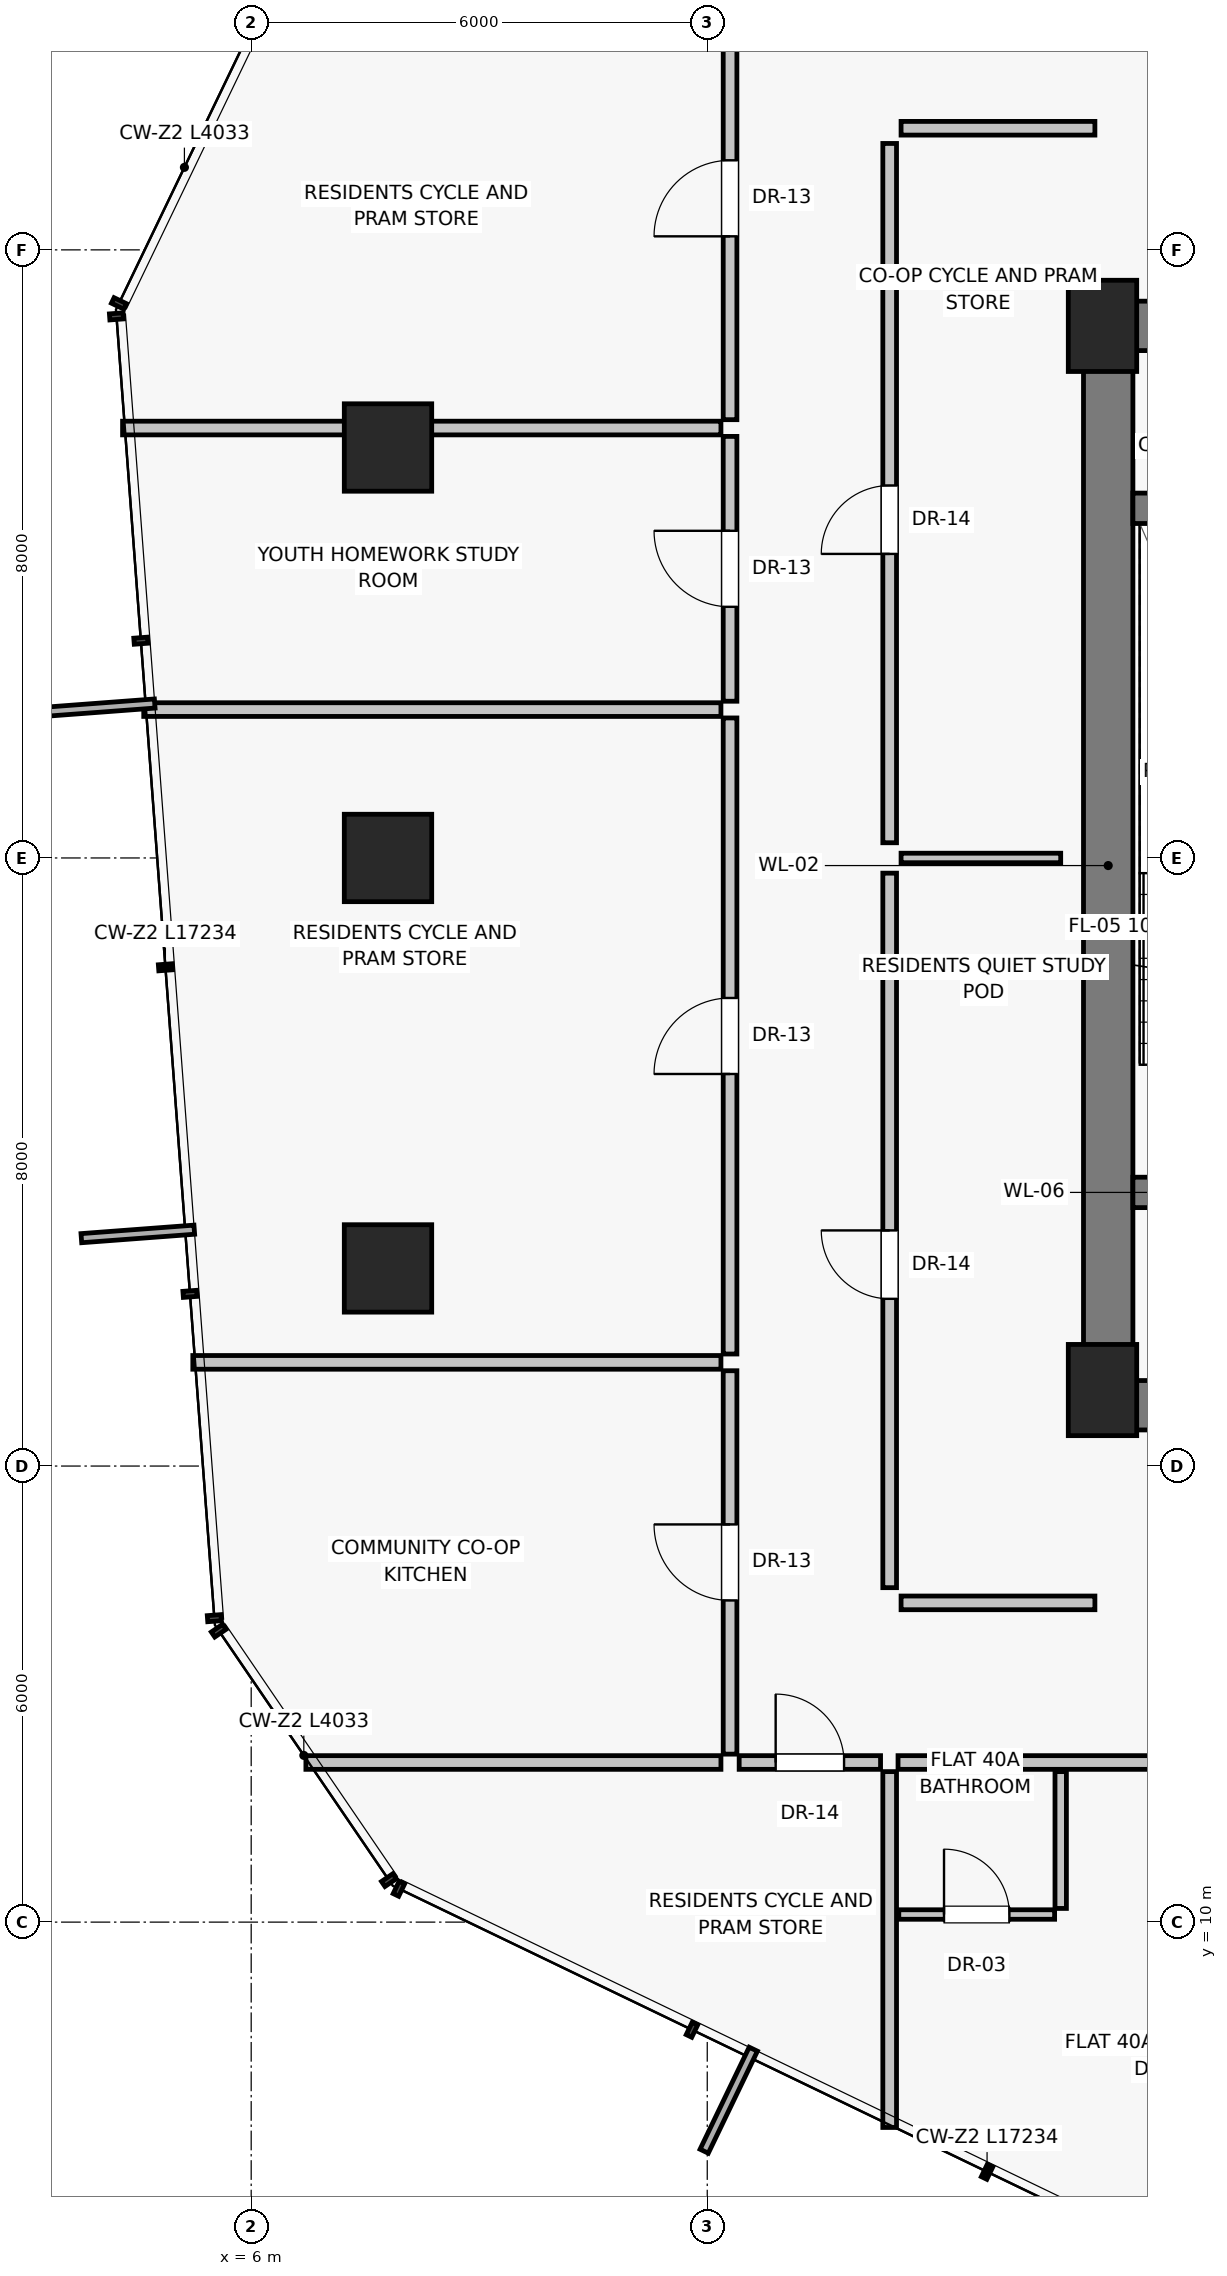
"""IFC4 building model, lengths in metres.
Left out: names, types, materials, properties, quantities, classifications, styles, units other than length and angle.
Written with IfcOpenShell. Run it as: python <this file> out.ifc"""

import sys

from ifc_helpers import new_model, si_unit, direction, frame, frame_2d, origin, origin_2d, place, context, subcontext, project, spatial, rectangle, extrude, source, transform, mapped, element, fill, save


model = new_model("IFC4")
c1 = context("Model", 3, precision=1e-05, world=origin(), true_north=direction((0.0, 1.0)))
c2 = subcontext(c1, "Body", "Model", "MODEL_VIEW")
j1 = project(units=[si_unit("LENGTHUNIT", "METRE"), si_unit("PLANEANGLEUNIT", "RADIAN")], contexts=[c1])
p1 = place(None, origin())
s1 = spatial("IfcSite", under=j1, at=p1, CompositionType="ELEMENT")
p2 = place(p1, origin())
s2 = spatial("IfcBuilding", under=s1, at=p2, CompositionType="ELEMENT")
p3 = place(p2, frame((0.0, 0.0, 142.5)))
s3 = spatial("IfcBuildingStorey", under=s2, at=p3, CompositionType="ELEMENT", Elevation=142.5)
for number, where, z_axis, x_axis in (
    (1, (17.2, 17.0, 0.0), (0.0, 0.0, 1.0), (1.0, 0.0, 0.0)),
    (2, (17.2, 31.0, 0.0), (0.0, 0.0, 1.0), (1.0, 0.0, 0.0)),
):
    element("IfcColumn", number, at=place(p3, frame(where, z_axis=z_axis, x_axis=x_axis)), inside=s3, PredefinedType="PILASTER", context=c2, shape_type="SweptSolid", body=[
        extrude(rectangle(XDim=0.9, YDim=1.2, at=origin_2d()), origin(), (0.0, 0.0, 1.0), 3.25),
    ])
for number, where, z_axis, x_axis in (
    (3, (7.8, 29.4, 0.0), (0.0, 0.0, 1.0), (1.0, 0.0, 0.0)),
    (4, (7.8, 24.0, 0.0), (0.0, 0.0, 1.0), (1.0, 0.0, 0.0)),
    (5, (7.8, 18.6, 0.0), (0.0, 0.0, 1.0), (1.0, 0.0, 0.0)),
):
    element("IfcColumn", number, at=place(p3, frame(where, z_axis=z_axis, x_axis=x_axis)), inside=s3, PredefinedType="COLUMN", context=c2, shape_type="SweptSolid", body=[
        extrude(rectangle(XDim=1.15, YDim=1.15, at=origin_2d()), origin(), (0.0, 0.0, 1.0), 3.25),
    ])
p4 = place(p3, frame((17.275, 16.8, 0.0), z_axis=(0.0, 0.0, 1.0), x_axis=(0.0, 1.0, 0.0)))
e6 = element("IfcWall", 6, at=p4, inside=s3, PredefinedType="SHEAR", context=c2, shape_type="SweptSolid", body=[
    extrude(rectangle(XDim=14.2, YDim=0.65, at=frame_2d((7.1, 0.0))), origin(), (0.0, 0.0, 1.0), 3.0),
])
p5 = place(p3, frame((17.2, 16.8, 0.0), z_axis=(0.0, 0.0, 1.0), x_axis=(1.0, 0.0, 0.0)))
e7 = element("IfcWall", 7, at=p5, inside=s3, PredefinedType="SHEAR", context=c2, shape_type="SweptSolid", body=[
    extrude(rectangle(XDim=5.85, YDim=0.65, at=frame_2d((2.925, 0.0))), origin(), (0.0, 0.0, 1.0), 3.0),
])
p6 = place(p5, frame((1.15, 0.0, 0.0)))
e8 = element("IfcOpeningElement", 8, at=p6, cuts=e7, PredefinedType="OPENING", context=c2, shape_type="SweptSolid", body=[
    extrude(rectangle(XDim=1.2, YDim=2.03, at=frame_2d((0.6, 1.015))), frame((0.0, 0.335, 0.0), z_axis=(0.0, -1.0, 0.0), x_axis=(1.0, 0.0, 0.0)), (0.0, 0.0, 1.0), 0.67),
])
p7 = place(p3, frame((17.2, 31.0, 0.0), z_axis=(0.0, 0.0, 1.0), x_axis=(1.0, 0.0, 0.0)))
e9 = element("IfcWall", 9, at=p7, inside=s3, PredefinedType="SHEAR", context=c2, shape_type="SweptSolid", body=[
    extrude(rectangle(XDim=3.8, YDim=0.65, at=frame_2d((1.9, 0.0))), origin(), (0.0, 0.0, 1.0), 3.0),
])
p8 = place(p7, frame((1.25, 0.0, 0.0)))
e10 = element("IfcOpeningElement", 10, at=p8, cuts=e9, PredefinedType="OPENING", context=c2, shape_type="SweptSolid", body=[
    extrude(rectangle(XDim=0.86, YDim=2.01, at=frame_2d((0.43, 1.005))), frame((0.0, 0.335, 0.0), z_axis=(0.0, -1.0, 0.0), x_axis=(1.0, 0.0, 0.0)), (0.0, 0.0, 1.0), 0.67),
])
p9 = place(p3, frame((17.6, 19.6, 0.0), z_axis=(0.0, 0.0, 1.0), x_axis=(1.0, 0.0, 0.0)))
e11 = element("IfcWall", 11, at=p9, inside=s3, PredefinedType="SHEAR", context=c2, shape_type="SweptSolid", body=[
    extrude(rectangle(XDim=3.4, YDim=0.4, at=frame_2d((1.7, 0.0))), origin(), (0.0, 0.0, 1.0), 3.0),
])
p10 = place(p9, frame((1.05, 0.0, 0.0)))
e12 = element("IfcOpeningElement", 12, at=p10, cuts=e11, PredefinedType="OPENING", context=c2, shape_type="SweptSolid", body=[
    extrude(rectangle(XDim=1.1, YDim=2.03, at=frame_2d((0.55, 1.015))), frame((0.0, 0.21, 0.0), z_axis=(0.0, -1.0, 0.0), x_axis=(1.0, 0.0, 0.0)), (0.0, 0.0, 1.0), 0.42),
])
p11 = place(p3, frame((17.6, 28.6, 0.0), z_axis=(0.0, 0.0, 1.0), x_axis=(1.0, 0.0, 0.0)))
e13 = element("IfcWall", 13, at=p11, inside=s3, PredefinedType="SHEAR", context=c2, shape_type="SweptSolid", body=[
    extrude(rectangle(XDim=3.4, YDim=0.4, at=frame_2d((1.7, 0.0))), origin(), (0.0, 0.0, 1.0), 3.0),
])
p12 = place(p3, frame((14.4, 14.4, 0.0), z_axis=(0.0, 0.0, 1.0), x_axis=(0.0, 1.0, 0.0)))
e14 = element("IfcWall", 14, at=p12, inside=s3, PredefinedType="PARTITIONING", context=c2, shape_type="SweptSolid", body=[
    extrude(rectangle(XDim=9.4, YDim=0.18, at=frame_2d((4.7, 0.0))), origin(), (0.0, 0.0, 1.0), 3.0),
])
p13 = place(p12, frame((3.8, 0.0, 0.0)))
e15 = element("IfcOpeningElement", 15, at=p13, cuts=e14, PredefinedType="OPENING", context=c2, shape_type="SweptSolid", body=[
    extrude(rectangle(XDim=0.9, YDim=2.01, at=frame_2d((0.45, 1.005))), frame((0.0, 0.1, 0.0), z_axis=(0.0, -1.0, 0.0), x_axis=(1.0, 0.0, 0.0)), (0.0, 0.0, 1.0), 0.2),
])
p14 = place(p3, frame((14.4, 24.2, 0.0), z_axis=(0.0, 0.0, 1.0), x_axis=(0.0, 1.0, 0.0)))
e16 = element("IfcWall", 16, at=p14, inside=s3, PredefinedType="PARTITIONING", context=c2, shape_type="SweptSolid", body=[
    extrude(rectangle(XDim=9.2, YDim=0.18, at=frame_2d((4.6, 0.0))), origin(), (0.0, 0.0, 1.0), 3.0),
])
p15 = place(p14, frame((3.8, 0.0, 0.0)))
e17 = element("IfcOpeningElement", 17, at=p15, cuts=e16, PredefinedType="OPENING", context=c2, shape_type="SweptSolid", body=[
    extrude(rectangle(XDim=0.9, YDim=2.01, at=frame_2d((0.45, 1.005))), frame((0.0, 0.1, 0.0), z_axis=(0.0, -1.0, 0.0), x_axis=(1.0, 0.0, 0.0)), (0.0, 0.0, 1.0), 0.2),
])
p16 = place(p3, frame((14.55, 24.0, 0.0), z_axis=(0.0, 0.0, 1.0), x_axis=(1.0, 0.0, 0.0)))
e18 = element("IfcWall", 18, at=p16, inside=s3, PredefinedType="PARTITIONING", context=c2, shape_type="SweptSolid", body=[
    extrude(rectangle(XDim=2.1, YDim=0.125, at=frame_2d((1.05, 0.0))), origin(), (0.0, 0.0, 1.0), 3.0),
])
for number, where, z_axis, x_axis in (
    (19, (14.55, 14.2, 0.0), (0.0, 0.0, 1.0), (1.0, 0.0, 0.0)),
    (20, (14.55, 33.6, 0.0), (0.0, 0.0, 1.0), (1.0, 0.0, 0.0)),
):
    element("IfcWall", number, at=place(p3, frame(where, z_axis=z_axis, x_axis=x_axis)), inside=s3, PredefinedType="PARTITIONING", context=c2, shape_type="SweptSolid", body=[
        extrude(rectangle(XDim=2.55, YDim=0.18, at=frame_2d((1.275, 0.0))), origin(), (0.0, 0.0, 1.0), 3.0),
    ])
p17 = place(p3, frame((14.4, 11.98, 0.0), z_axis=(0.0, 0.0, 1.0), x_axis=(0.0, -1.0, 0.0)))
e21 = element("IfcWall", 21, at=p17, inside=s3, PredefinedType="PARTITIONING", context=c2, shape_type="SweptSolid", body=[
    extrude(rectangle(XDim=4.681, YDim=0.18, at=frame_2d((2.341, 0.0))), origin(), (0.0, 0.0, 1.0), 3.0),
])
p18 = place(p3, frame((14.51, 12.1, 0.0), z_axis=(0.0, 0.0, 1.0), x_axis=(1.0, 0.0, 0.0)))
e22 = element("IfcWall", 22, at=p18, inside=s3, PredefinedType="PARTITIONING", context=c2, shape_type="SweptSolid", body=[
    extrude(rectangle(XDim=11.124, YDim=0.18, at=frame_2d((5.562, 0.0))), origin(), (0.0, 0.0, 1.0), 2.58),
])
p19 = place(p18, frame((3.717, 0.0, 0.0)))
e23 = element("IfcOpeningElement", 23, at=p19, cuts=e22, PredefinedType="OPENING", context=c2, shape_type="SweptSolid", body=[
    extrude(rectangle(XDim=0.95, YDim=2.02, at=frame_2d((0.475, 1.01))), frame((0.0, 0.1, 0.0), z_axis=(0.0, -1.0, 0.0), x_axis=(1.0, 0.0, 0.0)), (0.0, 0.0, 1.0), 0.2),
])
p20 = place(p3, frame((16.65, 11.98, 0.0), z_axis=(0.0, 0.0, 1.0), x_axis=(0.0, -1.0, 0.0)))
e24 = element("IfcWall", 24, at=p20, inside=s3, PredefinedType="PARTITIONING", context=c2, shape_type="SweptSolid", body=[
    extrude(rectangle(XDim=1.8, YDim=0.15, at=frame_2d((0.9, 0.0))), origin(), (0.0, 0.0, 1.0), 3.0),
])
p21 = place(p3, frame((14.52, 10.1, 0.0), z_axis=(0.0, 0.0, 1.0), x_axis=(1.0, 0.0, 0.0)))
e25 = element("IfcWall", 25, at=p21, inside=s3, PredefinedType="PARTITIONING", context=c2, shape_type="SweptSolid", body=[
    extrude(rectangle(XDim=2.05, YDim=0.125, at=frame_2d((1.025, 0.0))), origin(), (0.0, 0.0, 1.0), 3.0),
])
p22 = place(p21, frame((0.595, 0.0, 0.0)))
e26 = element("IfcOpeningElement", 26, at=p22, cuts=e25, PredefinedType="OPENING", context=c2, shape_type="SweptSolid", body=[
    extrude(rectangle(XDim=0.86, YDim=2.01, at=frame_2d((0.43, 1.005))), frame((0.0, 0.073, 0.0), z_axis=(0.0, -1.0, 0.0), x_axis=(1.0, 0.0, 0.0)), (0.0, 0.0, 1.0), 0.145),
])
p23 = place(p3, frame((12.18, 12.1, 0.0), z_axis=(0.0, 0.0, 1.0), x_axis=(-1.0, 0.0, 0.0)))
e27 = element("IfcWall", 27, at=p23, inside=s3, PredefinedType="PARTITIONING", context=c2, shape_type="SweptSolid", body=[
    extrude(rectangle(XDim=5.46, YDim=0.18, at=frame_2d((2.73, 0.0))), origin(), (0.0, 0.0, 1.0), 3.0),
])
p24 = place(p3, frame((12.3, 12.21, 0.0), z_axis=(0.0, 0.0, 1.0), x_axis=(0.0, 1.0, 0.0)))
e28 = element("IfcWall", 28, at=p24, inside=s3, PredefinedType="PARTITIONING", context=c2, shape_type="SweptSolid", body=[
    extrude(rectangle(XDim=5.044, YDim=0.18, at=frame_2d((2.522, 0.0))), origin(), (0.0, 0.0, 1.0), 3.0),
])
p25 = place(p24, frame((2.022, 0.0, 0.0)))
e29 = element("IfcOpeningElement", 29, at=p25, cuts=e28, PredefinedType="OPENING", context=c2, shape_type="SweptSolid", body=[
    extrude(rectangle(XDim=1.0, YDim=2.01, at=frame_2d((0.5, 1.005))), frame((0.0, 0.1, 0.0), z_axis=(0.0, -1.0, 0.0), x_axis=(1.0, 0.0, 0.0)), (0.0, 0.0, 1.0), 0.2),
])
p26 = place(p3, frame((12.3, 17.474, 0.0), z_axis=(0.0, 0.0, 1.0), x_axis=(0.0, 1.0, 0.0)))
e30 = element("IfcWall", 30, at=p26, inside=s3, PredefinedType="PARTITIONING", context=c2, shape_type="SweptSolid", body=[
    extrude(rectangle(XDim=8.368, YDim=0.18, at=frame_2d((4.184, 0.0))), origin(), (0.0, 0.0, 1.0), 2.58),
])
p27 = place(p26, frame((3.684, 0.0, 0.0)))
e31 = element("IfcOpeningElement", 31, at=p27, cuts=e30, PredefinedType="OPENING", context=c2, shape_type="SweptSolid", body=[
    extrude(rectangle(XDim=1.0, YDim=2.01, at=frame_2d((0.5, 1.005))), frame((0.0, 0.1, 0.0), z_axis=(0.0, -1.0, 0.0), x_axis=(1.0, 0.0, 0.0)), (0.0, 0.0, 1.0), 0.2),
])
p28 = place(p3, frame((12.18, 17.364, 0.0), z_axis=(0.0, 0.0, 1.0), x_axis=(-1.0, 0.0, 0.0)))
e32 = element("IfcWall", 32, at=p28, inside=s3, PredefinedType="PARTITIONING", context=c2, shape_type="SweptSolid", body=[
    extrude(rectangle(XDim=6.948, YDim=0.18, at=frame_2d((3.474, 0.0))), origin(), (0.0, 0.0, 1.0), 2.378),
])
p29 = place(p3, frame((12.18, 25.952, 0.0), z_axis=(0.0, 0.0, 1.0), x_axis=(-1.0, 0.0, 0.0)))
e33 = element("IfcWall", 33, at=p29, inside=s3, PredefinedType="PARTITIONING", context=c2, shape_type="SweptSolid", body=[
    extrude(rectangle(XDim=7.594, YDim=0.18, at=frame_2d((3.797, 0.0))), origin(), (0.0, 0.0, 1.0), 3.0),
])
p30 = place(p3, frame((12.3, 26.062, 0.0), z_axis=(0.0, 0.0, 1.0), x_axis=(0.0, 1.0, 0.0)))
e34 = element("IfcWall", 34, at=p30, inside=s3, PredefinedType="PARTITIONING", context=c2, shape_type="SweptSolid", body=[
    extrude(rectangle(XDim=3.484, YDim=0.18, at=frame_2d((1.742, 0.0))), origin(), (0.0, 0.0, 1.0), 2.58),
])
p31 = place(p30, frame((1.242, 0.0, 0.0)))
e35 = element("IfcOpeningElement", 35, at=p31, cuts=e34, PredefinedType="OPENING", context=c2, shape_type="SweptSolid", body=[
    extrude(rectangle(XDim=1.0, YDim=2.01, at=frame_2d((0.5, 1.005))), frame((0.0, 0.1, 0.0), z_axis=(0.0, -1.0, 0.0), x_axis=(1.0, 0.0, 0.0)), (0.0, 0.0, 1.0), 0.2),
])
p32 = place(p3, frame((12.3, 29.766, 0.0), z_axis=(0.0, 0.0, 1.0), x_axis=(0.0, 1.0, 0.0)))
e36 = element("IfcWall", 36, at=p32, inside=s3, PredefinedType="PARTITIONING", context=c2, shape_type="SweptSolid", body=[
    extrude(rectangle(XDim=5.824, YDim=0.18, at=frame_2d((2.912, 0.0))), origin(), (0.0, 0.0, 1.0), 2.58),
])
p33 = place(p32, frame((2.412, 0.0, 0.0)))
e37 = element("IfcOpeningElement", 37, at=p33, cuts=e36, PredefinedType="OPENING", context=c2, shape_type="SweptSolid", body=[
    extrude(rectangle(XDim=1.0, YDim=2.01, at=frame_2d((0.5, 1.005))), frame((0.0, 0.1, 0.0), z_axis=(0.0, -1.0, 0.0), x_axis=(1.0, 0.0, 0.0)), (0.0, 0.0, 1.0), 0.2),
])
p34 = place(p3, frame((12.18, 29.656, 0.0), z_axis=(0.0, 0.0, 1.0), x_axis=(-1.0, 0.0, 0.0)))
e38 = element("IfcWall", 38, at=p34, inside=s3, PredefinedType="PARTITIONING", context=c2, shape_type="SweptSolid", body=[
    extrude(rectangle(XDim=7.872, YDim=0.18, at=frame_2d((3.936, 0.0))), origin(), (0.0, 0.0, 1.0), 2.378),
])
p35 = place(p3, frame((12.42, 12.1, 0.0), z_axis=(0.0, 0.0, 1.0), x_axis=(1.0, 0.0, 0.0)))
e39 = element("IfcWall", 39, at=p35, inside=s3, PredefinedType="PARTITIONING", context=c2, shape_type="SweptSolid", body=[
    extrude(rectangle(XDim=1.86, YDim=0.18, at=frame_2d((0.93, 0.0))), origin(), (0.0, 0.0, 1.0), 3.0),
])
p36 = place(p35, frame((0.48, 0.0, 0.0)))
e40 = element("IfcOpeningElement", 40, at=p36, cuts=e39, PredefinedType="OPENING", context=c2, shape_type="SweptSolid", body=[
    extrude(rectangle(XDim=0.9, YDim=2.01, at=frame_2d((0.45, 1.005))), frame((0.0, 0.1, 0.0), z_axis=(0.0, -1.0, 0.0), x_axis=(1.0, 0.0, 0.0)), (0.0, 0.0, 1.0), 0.2),
])
m1 = source(origin(), c2, "Body", "SweptSolid", [
    extrude(rectangle(XDim=0.9, YDim=2.01, at=frame_2d((0.45, 1.005))), frame((0.0, 0.025, 0.0), z_axis=(0.0, -1.0, 0.0), x_axis=(1.0, 0.0, 0.0)), (0.0, 0.0, 1.0), 0.05),
])
p37 = place(p13, origin())
e41 = element("IfcDoor", 41, at=p37, inside=s3, OperationType="SINGLE_SWING_RIGHT", PredefinedType="DOOR", context=c2, shape_type="MappedRepresentation", body=[
    mapped(m1, transform((0.0, 0.0, 0.0), scale=1.0)),
])
fill(e15, e41)
p38 = place(p15, origin())
e42 = element("IfcDoor", 42, at=p38, inside=s3, OperationType="SINGLE_SWING_LEFT", PredefinedType="DOOR", context=c2, shape_type="MappedRepresentation", body=[
    mapped(m1, transform((0.0, 0.0, 0.0), scale=1.0)),
])
fill(e17, e42)
m2 = source(origin(), c2, "Body", "SweptSolid", [
    extrude(rectangle(XDim=0.86, YDim=2.01, at=frame_2d((0.43, 1.005))), frame((0.0, 0.025, 0.0), z_axis=(0.0, -1.0, 0.0), x_axis=(1.0, 0.0, 0.0)), (0.0, 0.0, 1.0), 0.05),
])
p39 = place(p22, origin())
e43 = element("IfcDoor", 43, at=p39, inside=s3, OperationType="SINGLE_SWING_LEFT", PredefinedType="DOOR", context=c2, shape_type="MappedRepresentation", body=[
    mapped(m2, transform((0.0, 0.0, 0.0), scale=1.0)),
])
fill(e26, e43)
m3 = source(origin(), c2, "Body", "SweptSolid", [
    extrude(rectangle(XDim=1.0, YDim=2.01, at=frame_2d((0.5, 1.005))), frame((0.0, 0.025, 0.0), z_axis=(0.0, -1.0, 0.0), x_axis=(1.0, 0.0, 0.0)), (0.0, 0.0, 1.0), 0.05),
])
p40 = place(p25, origin())
e44 = element("IfcDoor", 44, at=p40, inside=s3, OperationType="SINGLE_SWING_RIGHT", PredefinedType="DOOR", context=c2, shape_type="MappedRepresentation", body=[
    mapped(m3, transform((0.0, 0.0, 0.0), scale=1.0)),
])
fill(e29, e44)
p41 = place(p27, origin())
e45 = element("IfcDoor", 45, at=p41, inside=s3, OperationType="SINGLE_SWING_LEFT", PredefinedType="DOOR", context=c2, shape_type="MappedRepresentation", body=[
    mapped(m3, transform((0.0, 0.0, 0.0), scale=1.0)),
])
fill(e31, e45)
p42 = place(p31, origin())
e46 = element("IfcDoor", 46, at=p42, inside=s3, OperationType="SINGLE_SWING_RIGHT", PredefinedType="DOOR", context=c2, shape_type="MappedRepresentation", body=[
    mapped(m3, transform((0.0, 0.0, 0.0), scale=1.0)),
])
fill(e35, e46)
p43 = place(p33, origin())
e47 = element("IfcDoor", 47, at=p43, inside=s3, OperationType="SINGLE_SWING_LEFT", PredefinedType="DOOR", context=c2, shape_type="MappedRepresentation", body=[
    mapped(m3, transform((0.0, 0.0, 0.0), scale=1.0)),
])
fill(e37, e47)
p44 = place(p36, origin())
e48 = element("IfcDoor", 48, at=p44, inside=s3, OperationType="SINGLE_SWING_LEFT", PredefinedType="DOOR", context=c2, shape_type="MappedRepresentation", body=[
    mapped(m1, transform((0.0, 0.0, 0.0), scale=1.0)),
])
fill(e40, e48)
save(model, sys.argv[1])
